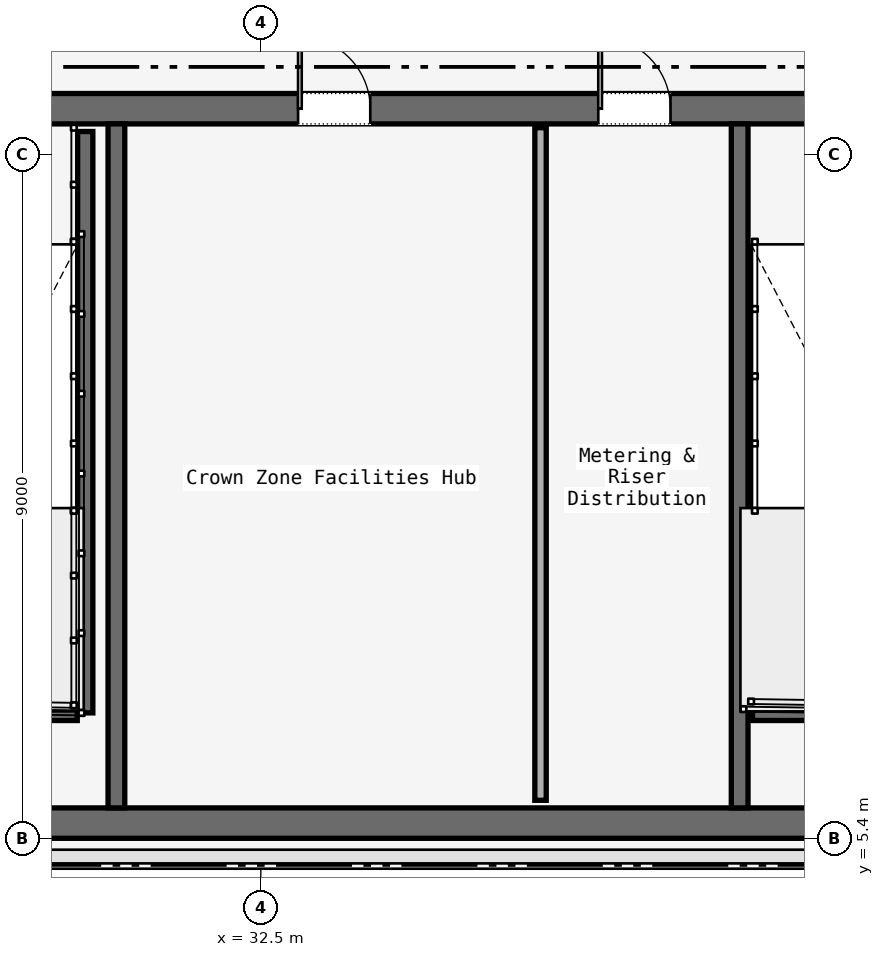
"""IFC4 building model, lengths in metres.
Left out: names, types, materials, properties, quantities, classifications, styles, units other than length and angle.
Written with IfcOpenShell. Run it as: python <this file> out.ifc"""

import sys

from ifc_helpers import new_model, si_unit, direction, frame, frame_2d, origin, place, context, subcontext, project, spatial, rectangle, extrude, element, fill, save


model = new_model("IFC4")
c1 = context("Model", 3, precision=1e-05, world=origin(), true_north=direction((0.0, 1.0)))
c2 = subcontext(c1, "Body", "Model", "MODEL_VIEW")
j1 = project(units=[si_unit("LENGTHUNIT", "METRE"), si_unit("PLANEANGLEUNIT", "RADIAN")], contexts=[c1])
p1 = place(None, origin())
s1 = spatial("IfcSite", under=j1, at=p1, CompositionType="ELEMENT")
p2 = place(p1, origin())
s2 = spatial("IfcBuilding", under=s1, at=p2, CompositionType="ELEMENT")
p3 = place(p2, frame((0.0, 0.0, 298.5)))
s3 = spatial("IfcBuildingStorey", under=s2, at=p3, CompositionType="ELEMENT", Elevation=298.5)
p4 = place(p3, frame((26.45, 15.0, 0.0), z_axis=(0.0, 0.0, 1.0), x_axis=(1.0, 0.0, 0.0)))
e1 = element("IfcWall", 1, at=p4, inside=s3, PredefinedType="SOLIDWALL", context=c2, shape_type="SweptSolid", body=[
    extrude(rectangle(XDim=31.1, YDim=0.4, at=frame_2d((15.55, 0.0))), origin(), (0.0, 0.0, 1.0), 4.52),
])
p5 = place(p4, frame((1.65, 0.0, 0.0)))
e2 = element("IfcOpeningElement", 2, at=p5, cuts=e1, PredefinedType="OPENING", context=c2, shape_type="SweptSolid", body=[
    extrude(rectangle(XDim=1.1, YDim=2.2, at=frame_2d((0.55, 1.1))), frame((0.0, 0.2, 0.0), z_axis=(0.0, -1.0, 0.0), x_axis=(1.0, 0.0, 0.0)), (0.0, 0.0, 1.0), 0.4),
])
p6 = place(p4, frame((13.65, 0.0, 0.0)))
e3 = element("IfcOpeningElement", 3, at=p6, cuts=e1, PredefinedType="OPENING", context=c2, shape_type="SweptSolid", body=[
    extrude(rectangle(XDim=1.1, YDim=2.2, at=frame_2d((0.55, 1.1))), frame((0.0, 0.2, 0.0), z_axis=(0.0, -1.0, 0.0), x_axis=(1.0, 0.0, 0.0)), (0.0, 0.0, 1.0), 0.4),
])
p7 = place(p4, frame((25.55, 0.0, 0.0)))
e4 = element("IfcOpeningElement", 4, at=p7, cuts=e1, PredefinedType="OPENING", context=c2, shape_type="SweptSolid", body=[
    extrude(rectangle(XDim=1.1, YDim=2.2, at=frame_2d((0.55, 1.1))), frame((0.0, 0.2, 0.0), z_axis=(0.0, -1.0, 0.0), x_axis=(1.0, 0.0, 0.0)), (0.0, 0.0, 1.0), 0.4),
])
p8 = place(p4, frame((19.35, 0.0, 0.0)))
e5 = element("IfcOpeningElement", 5, at=p8, cuts=e1, PredefinedType="OPENING", context=c2, shape_type="SweptSolid", body=[
    extrude(rectangle(XDim=1.1, YDim=2.2, at=frame_2d((0.55, 1.1))), frame((0.0, 0.2, 0.0), z_axis=(0.0, -1.0, 0.0), x_axis=(1.0, 0.0, 0.0)), (0.0, 0.0, 1.0), 0.4),
])
p9 = place(p4, frame((21.4, 0.0, 0.0)))
e6 = element("IfcOpeningElement", 6, at=p9, cuts=e1, PredefinedType="OPENING", context=c2, shape_type="SweptSolid", body=[
    extrude(rectangle(XDim=0.9, YDim=2.1, at=frame_2d((0.45, 1.05))), frame((0.0, 0.2, 0.0), z_axis=(0.0, -1.0, 0.0), x_axis=(1.0, 0.0, 0.0)), (0.0, 0.0, 1.0), 0.4),
])
p10 = place(p4, frame((6.54, 0.0, 0.0)))
e7 = element("IfcOpeningElement", 7, at=p10, cuts=e1, PredefinedType="OPENING", context=c2, shape_type="SweptSolid", body=[
    extrude(rectangle(XDim=0.95, YDim=2.2, at=frame_2d((0.475, 1.1))), frame((0.0, 0.2, 0.0), z_axis=(0.0, -1.0, 0.0), x_axis=(1.0, 0.0, 0.0)), (0.0, 0.0, 1.0), 0.4),
])
p11 = place(p4, frame((10.49, 0.0, 0.0)))
e8 = element("IfcOpeningElement", 8, at=p11, cuts=e1, PredefinedType="OPENING", context=c2, shape_type="SweptSolid", body=[
    extrude(rectangle(XDim=0.95, YDim=2.2, at=frame_2d((0.475, 1.1))), frame((0.0, 0.2, 0.0), z_axis=(0.0, -1.0, 0.0), x_axis=(1.0, 0.0, 0.0)), (0.0, 0.0, 1.0), 0.4),
])
p12 = place(p4, frame((23.35, 0.0, 0.0)))
e9 = element("IfcOpeningElement", 9, at=p12, cuts=e1, PredefinedType="OPENING", context=c2, shape_type="SweptSolid", body=[
    extrude(rectangle(XDim=1.3, YDim=2.3, at=frame_2d((0.65, 1.15))), frame((0.0, 0.2, 0.0), z_axis=(0.0, -1.0, 0.0), x_axis=(1.0, 0.0, 0.0)), (0.0, 0.0, 1.0), 0.4),
])
p13 = place(p3, frame((26.45, 5.6, 0.0), z_axis=(0.0, 0.0, 1.0), x_axis=(1.0, 0.0, 0.0)))
e10 = element("IfcWall", 10, at=p13, inside=s3, PredefinedType="SOLIDWALL", context=c2, shape_type="SweptSolid", body=[
    extrude(rectangle(XDim=31.1, YDim=0.4, at=frame_2d((15.55, 0.0))), origin(), (0.0, 0.0, 1.0), 4.52),
])
for number, where, z_axis, x_axis in (
    (11, (30.6, 5.8, 0.0), (0.0, 0.0, 1.0), (0.0, 1.0, 0.0)),
    (12, (38.8, 5.8, 0.0), (0.0, 0.0, 1.0), (0.0, 1.0, 0.0)),
):
    element("IfcWall", number, at=place(p3, frame(where, z_axis=z_axis, x_axis=x_axis)), inside=s3, PredefinedType="SOLIDWALL", context=c2, shape_type="SweptSolid", body=[
        extrude(rectangle(XDim=9.0, YDim=0.22, at=frame_2d((4.5, 0.0))), origin(), (0.0, 0.0, 1.0), 4.52),
    ])
p14 = place(p3, frame((30.19, 14.7, 0.0), z_axis=(0.0, 0.0, 1.0), x_axis=(0.0, -1.0, 0.0)))
e13 = element("IfcWall", 13, at=p14, inside=s3, PredefinedType="SOLIDWALL", context=c2, shape_type="SweptSolid", body=[
    extrude(rectangle(XDim=7.65, YDim=0.2, at=frame_2d((3.825, 0.0))), origin(), (0.0, 0.0, 1.0), 4.8),
])
for number, where, z_axis, x_axis in (
    (14, (26.97, 7.05, 0.0), (0.0, 0.0, 1.0), (1.0, 0.0, 0.0)),
    (15, (38.97, 7.05, 0.0), (0.0, 0.0, 1.0), (1.0, 0.0, 0.0)),
):
    element("IfcWall", number, at=place(p3, frame(where, z_axis=z_axis, x_axis=x_axis)), inside=s3, PredefinedType="SOLIDWALL", context=c2, shape_type="SweptSolid", body=[
        extrude(rectangle(XDim=3.115, YDim=0.2, at=frame_2d((1.558, 0.0))), origin(), (0.0, 0.0, 1.0), 4.8),
    ])
p15 = place(p3, frame((36.18, 5.9, 0.0), z_axis=(0.0, 0.0, 1.0), x_axis=(0.0, 1.0, 0.0)))
e16 = element("IfcWall", 16, at=p15, inside=s3, PredefinedType="PARTITIONING", context=c2, shape_type="SweptSolid", body=[
    extrude(rectangle(XDim=8.85, YDim=0.15, at=frame_2d((4.425, 0.0))), origin(), (0.0, 0.0, 1.0), 3.95),
])
p16 = place(p10, origin())
e17 = element("IfcDoor", 17, at=p16, inside=s3, OperationType="SINGLE_SWING_LEFT", PredefinedType="DOOR", context=c2, shape_type="SweptSolid", body=[
    extrude(rectangle(XDim=0.95, YDim=2.2, at=frame_2d((0.475, 1.1))), frame((0.0, 0.025, 0.0), z_axis=(0.0, -1.0, 0.0), x_axis=(1.0, 0.0, 0.0)), (0.0, 0.0, 1.0), 0.05),
])
fill(e7, e17)
p17 = place(p11, origin())
e18 = element("IfcDoor", 18, at=p17, inside=s3, OperationType="SINGLE_SWING_RIGHT", PredefinedType="DOOR", context=c2, shape_type="SweptSolid", body=[
    extrude(rectangle(XDim=0.95, YDim=2.2, at=frame_2d((0.475, 1.1))), frame((0.0, 0.025, 0.0), z_axis=(0.0, -1.0, 0.0), x_axis=(1.0, 0.0, 0.0)), (0.0, 0.0, 1.0), 0.05),
])
fill(e8, e18)
save(model, sys.argv[1])
